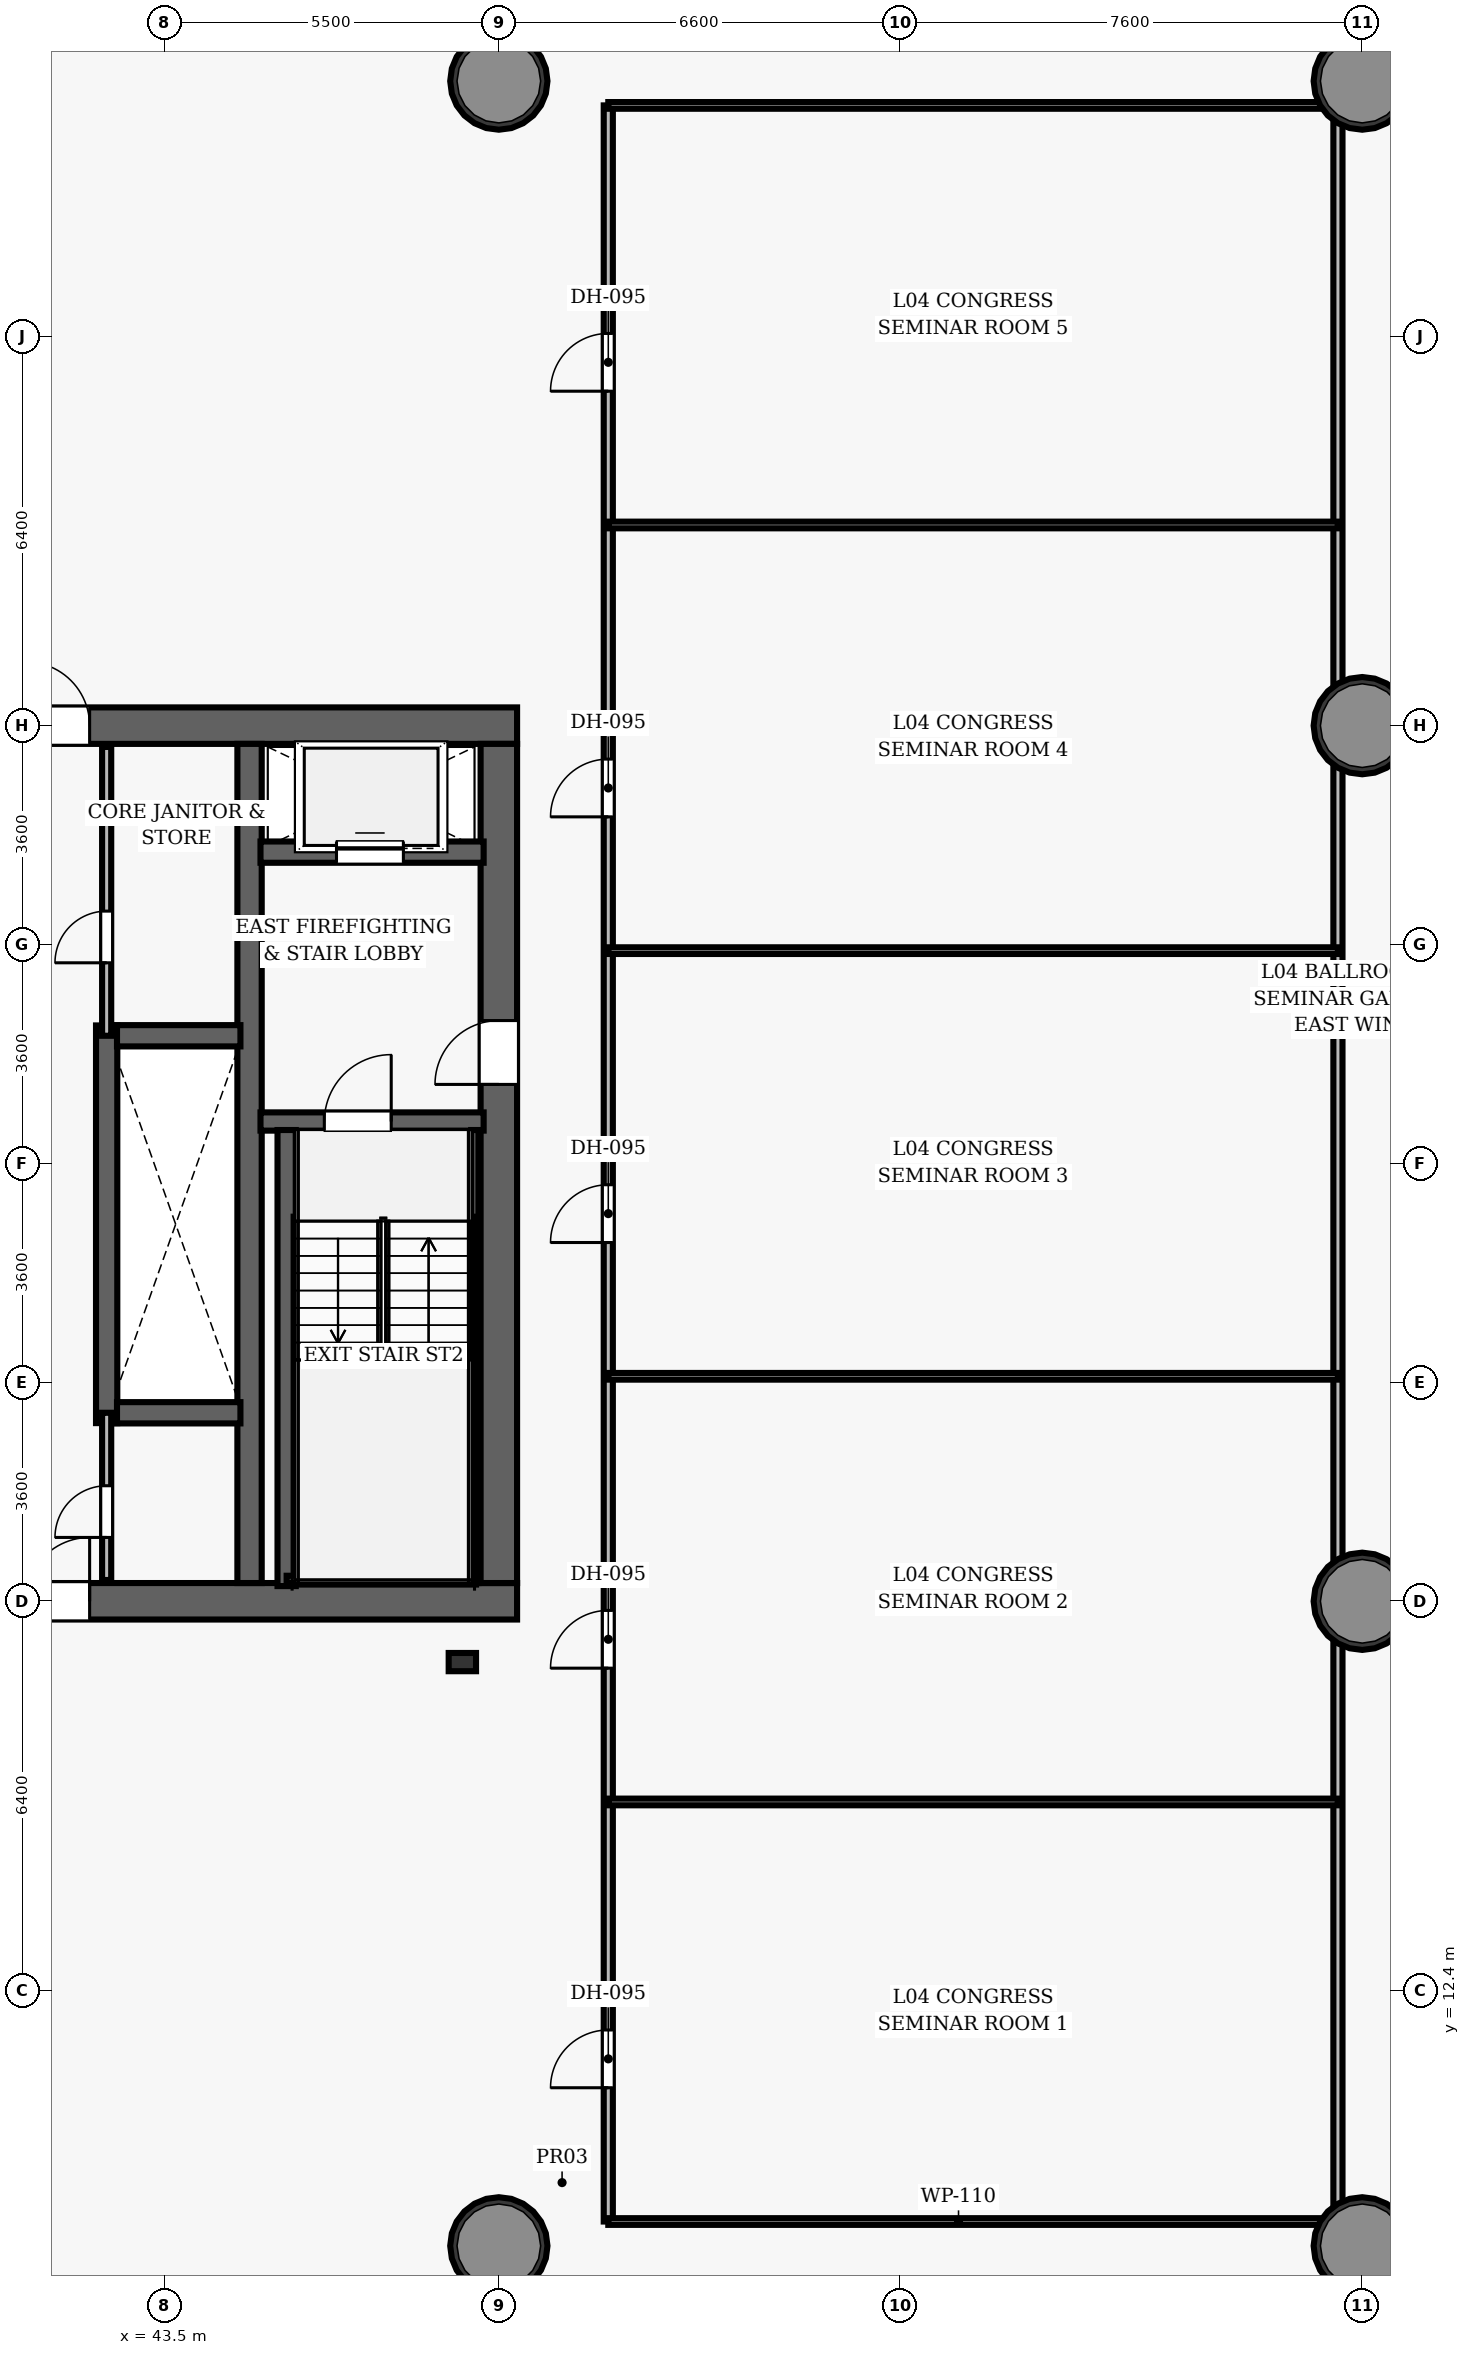
"""IFC4 building model, lengths in metres.
Left out: names, types, materials, properties, quantities, classifications, styles, units other than length and angle.
Written with IfcOpenShell. Run it as: python <this file> out.ifc"""

import sys

from ifc_helpers import new_model, si_unit, direction, frame, frame_2d, origin, origin_2d, place, context, subcontext, project, spatial, rectangle, hollow_circle, extrude, element, fill, save


model = new_model("IFC4")
c1 = context("Model", 3, precision=1e-05, world=origin(), true_north=direction((0.0, 1.0)))
c2 = subcontext(c1, "Body", "Model", "MODEL_VIEW")
j1 = project(units=[si_unit("LENGTHUNIT", "METRE"), si_unit("PLANEANGLEUNIT", "RADIAN")], contexts=[c1])
p1 = place(None, origin())
s1 = spatial("IfcSite", under=j1, at=p1, CompositionType="ELEMENT")
p2 = place(p1, origin())
s2 = spatial("IfcBuilding", under=s1, at=p2, CompositionType="ELEMENT")
p3 = place(p2, frame((0.0, 0.0, 24.0)))
s3 = spatial("IfcBuildingStorey", under=s2, at=p3, CompositionType="ELEMENT", Elevation=24.0)
p4 = place(p3, frame((26.7, 18.8, 0.0), z_axis=(0.0, 0.0, 1.0), x_axis=(1.0, 0.0, 0.0)))
e1 = element("IfcWall", 1, at=p4, inside=s3, PredefinedType="SHEAR", context=c2, shape_type="SweptSolid", body=[
    extrude(rectangle(XDim=22.6, YDim=0.6, at=frame_2d((11.3, 0.0))), origin(), (0.0, 0.0, 1.0), 6.0),
])
p5 = place(p4, frame((14.52, 0.0, 0.0)))
e2 = element("IfcOpeningElement", 2, at=p5, cuts=e1, PredefinedType="OPENING", context=c2, shape_type="SweptSolid", body=[
    extrude(rectangle(XDim=1.05, YDim=2.15, at=frame_2d((0.525, 1.075))), frame((0.0, 0.31, 0.0), z_axis=(0.0, -1.0, 0.0), x_axis=(1.0, 0.0, 0.0)), (0.0, 0.0, 1.0), 0.62),
])
p6 = place(p3, frame((26.7, 33.2, 0.0), z_axis=(0.0, 0.0, 1.0), x_axis=(1.0, 0.0, 0.0)))
e3 = element("IfcWall", 3, at=p6, inside=s3, PredefinedType="SHEAR", context=c2, shape_type="SweptSolid", body=[
    extrude(rectangle(XDim=22.6, YDim=0.6, at=frame_2d((11.3, 0.0))), origin(), (0.0, 0.0, 1.0), 6.0),
])
p7 = place(p6, frame((4.62, 0.0, 0.0)))
e4 = element("IfcOpeningElement", 4, at=p7, cuts=e3, PredefinedType="OPENING", context=c2, shape_type="SweptSolid", body=[
    extrude(rectangle(XDim=1.05, YDim=2.15, at=frame_2d((0.525, 1.075))), frame((0.0, 0.31, 0.0), z_axis=(0.0, -1.0, 0.0), x_axis=(1.0, 0.0, 0.0)), (0.0, 0.0, 1.0), 0.62),
])
p8 = place(p6, frame((14.52, 0.0, 0.0)))
e5 = element("IfcOpeningElement", 5, at=p8, cuts=e3, PredefinedType="OPENING", context=c2, shape_type="SweptSolid", body=[
    extrude(rectangle(XDim=1.05, YDim=2.15, at=frame_2d((0.525, 1.075))), frame((0.0, 0.31, 0.0), z_axis=(0.0, -1.0, 0.0), x_axis=(1.0, 0.0, 0.0)), (0.0, 0.0, 1.0), 0.62),
])
p9 = place(p3, frame((49.0, 19.1, 0.0), z_axis=(0.0, 0.0, 1.0), x_axis=(0.0, 1.0, 0.0)))
e6 = element("IfcWall", 6, at=p9, inside=s3, PredefinedType="SHEAR", context=c2, shape_type="SweptSolid", body=[
    extrude(rectangle(XDim=13.8, YDim=0.6, at=frame_2d((6.9, 0.0))), origin(), (0.0, 0.0, 1.0), 6.0),
])
p10 = place(p9, frame((8.2, 0.0, 0.0)))
e7 = element("IfcOpeningElement", 7, at=p10, cuts=e6, PredefinedType="OPENING", context=c2, shape_type="SweptSolid", body=[
    extrude(rectangle(XDim=1.05, YDim=2.15, at=frame_2d((0.525, 1.075))), frame((0.0, 0.31, 0.0), z_axis=(0.0, -1.0, 0.0), x_axis=(1.0, 0.0, 0.0)), (0.0, 0.0, 1.0), 0.62),
])
p11 = place(p3, frame((44.9, 19.1, 0.0), z_axis=(0.0, 0.0, 1.0), x_axis=(0.0, 1.0, 0.0)))
e8 = element("IfcWall", 8, at=p11, inside=s3, PredefinedType="SHEAR", context=c2, shape_type="SweptSolid", body=[
    extrude(rectangle(XDim=13.8, YDim=0.4, at=frame_2d((6.9, 0.0))), origin(), (0.0, 0.0, 1.0), 6.0),
])
for number, where, z_axis, x_axis in (
    (9, (49.0, 8.2, 0.0), (0.0, 0.0, 1.0), (1.0, 0.0, 0.0)),
    (10, (63.2, 8.2, 0.0), (0.0, 0.0, 1.0), (1.0, 0.0, 0.0)),
    (11, (63.2, 18.8, 0.0), (0.0, 0.0, 1.0), (1.0, 0.0, 0.0)),
    (12, (63.2, 33.2, 0.0), (0.0, 0.0, 1.0), (1.0, 0.0, 0.0)),
    (13, (49.0, 43.8, 0.0), (0.0, 0.0, 1.0), (1.0, 0.0, 0.0)),
    (14, (63.2, 43.8, 0.0), (0.0, 0.0, 1.0), (1.0, 0.0, 0.0)),
):
    element("IfcColumn", number, at=place(p3, frame(where, z_axis=z_axis, x_axis=x_axis)), inside=s3, PredefinedType="COLUMN", context=c2, shape_type="SweptSolid", body=[
        extrude(hollow_circle(Radius=0.8, WallThickness=0.06, at=origin_2d()), origin(), (0.0, 0.0, 1.0), 6.0),
    ])
p12 = place(p3, frame((45.08, 26.69, 0.0), z_axis=(0.0, 0.0, 1.0), x_axis=(1.0, 0.0, 0.0)))
e15 = element("IfcWall", 15, at=p12, inside=s3, PredefinedType="SHEAR", context=c2, shape_type="SweptSolid", body=[
    extrude(rectangle(XDim=3.67, YDim=0.3, at=frame_2d((1.835, 0.0))), origin(), (0.0, 0.0, 1.0), 6.0),
])
p13 = place(p12, frame((1.05, 0.0, 0.0)))
e16 = element("IfcOpeningElement", 16, at=p13, cuts=e15, PredefinedType="OPENING", context=c2, shape_type="SweptSolid", body=[
    extrude(rectangle(XDim=1.1, YDim=2.15, at=frame_2d((0.55, 1.075))), frame((0.0, 0.16, 0.0), z_axis=(0.0, -1.0, 0.0), x_axis=(1.0, 0.0, 0.0)), (0.0, 0.0, 1.0), 0.32),
])
p14 = place(p3, frame((45.51, 19.05, 0.0), z_axis=(0.0, 0.0, 1.0), x_axis=(0.0, 1.0, 0.0)))
e17 = element("IfcWall", 17, at=p14, inside=s3, PredefinedType="SHEAR", context=c2, shape_type="SweptSolid", body=[
    extrude(rectangle(XDim=7.5, YDim=0.3, at=frame_2d((3.75, 0.0))), origin(), (0.0, 0.0, 1.0), 6.0),
])
p15 = place(p3, frame((48.605, 19.1, 0.0), z_axis=(0.0, 0.0, 1.0), x_axis=(0.0, 1.0, 0.0)))
e18 = element("IfcWall", 18, at=p15, inside=s3, PredefinedType="SHEAR", context=c2, shape_type="SweptSolid", body=[
    extrude(rectangle(XDim=7.45, YDim=0.12, at=frame_2d((3.725, 0.0))), origin(), (0.0, 0.0, 1.0), 6.0),
])
p16 = place(p3, frame((45.51, 19.16, 0.0), z_axis=(0.0, 0.0, 1.0), x_axis=(1.0, 0.0, 0.0)))
e19 = element("IfcWall", 19, at=p16, inside=s3, PredefinedType="SHEAR", context=c2, shape_type="SweptSolid", body=[
    extrude(rectangle(XDim=3.095, YDim=0.12, at=frame_2d((1.547, 0.0))), origin(), (0.0, 0.0, 1.0), 6.0),
])
p17 = place(p3, frame((45.08, 31.12, 0.0), z_axis=(0.0, 0.0, 1.0), x_axis=(1.0, 0.0, 0.0)))
e20 = element("IfcWall", 20, at=p17, inside=s3, PredefinedType="SHEAR", context=c2, shape_type="SweptSolid", body=[
    extrude(rectangle(XDim=3.67, YDim=0.35, at=frame_2d((1.835, 0.0))), origin(), (0.0, 0.0, 1.0), 4.71),
])
p18 = place(p17, frame((1.25, 0.0, 0.0)))
e21 = element("IfcOpeningElement", 21, at=p18, cuts=e20, PredefinedType="OPENING", context=c2, shape_type="SweptSolid", body=[
    extrude(rectangle(XDim=1.1, YDim=2.15, at=frame_2d((0.55, 1.075))), frame((0.0, 0.185, 0.0), z_axis=(0.0, -1.0, 0.0), x_axis=(1.0, 0.0, 0.0)), (0.0, 0.0, 1.0), 0.37),
])
p19 = place(p3, frame((42.55, 21.73, 0.0), z_axis=(0.0, 0.0, 1.0), x_axis=(0.0, 1.0, 0.0)))
e22 = element("IfcWall", 22, at=p19, inside=s3, PredefinedType="SHEAR", context=c2, shape_type="SweptSolid", body=[
    extrude(rectangle(XDim=6.54, YDim=0.35, at=frame_2d((3.27, 0.0))), origin(), (0.0, 0.0, 1.0), 4.71),
])
for number, where, z_axis, x_axis in (
    (23, (42.72, 21.9, 0.0), (0.0, 0.0, 1.0), (1.0, 0.0, 0.0)),
    (24, (42.72, 28.1, 0.0), (0.0, 0.0, 1.0), (1.0, 0.0, 0.0)),
):
    element("IfcWall", number, at=place(p3, frame(where, z_axis=z_axis, x_axis=x_axis)), inside=s3, PredefinedType="SHEAR", context=c2, shape_type="SweptSolid", body=[
        extrude(rectangle(XDim=2.03, YDim=0.35, at=frame_2d((1.015, 0.0))), origin(), (0.0, 0.0, 1.0), 4.71),
    ])
p20 = place(p3, frame((42.55, 28.1, 0.0), z_axis=(0.0, 0.0, 1.0), x_axis=(0.0, 1.0, 0.0)))
e25 = element("IfcWall", 25, at=p20, inside=s3, PredefinedType="PARTITIONING", context=c2, shape_type="SweptSolid", body=[
    extrude(rectangle(XDim=4.75, YDim=0.15, at=frame_2d((2.375, 0.0))), origin(), (0.0, 0.0, 1.0), 4.71),
])
p21 = place(p20, frame((1.2, 0.0, 0.0)))
e26 = element("IfcOpeningElement", 26, at=p21, cuts=e25, PredefinedType="OPENING", context=c2, shape_type="SweptSolid", body=[
    extrude(rectangle(XDim=0.85, YDim=2.1, at=frame_2d((0.425, 1.05))), frame((0.0, 0.085, 0.0), z_axis=(0.0, -1.0, 0.0), x_axis=(1.0, 0.0, 0.0)), (0.0, 0.0, 1.0), 0.17),
])
p22 = place(p3, frame((42.55, 19.15, 0.0), z_axis=(0.0, 0.0, 1.0), x_axis=(0.0, 1.0, 0.0)))
e27 = element("IfcWall", 27, at=p22, inside=s3, PredefinedType="PARTITIONING", context=c2, shape_type="SweptSolid", body=[
    extrude(rectangle(XDim=2.75, YDim=0.15, at=frame_2d((1.375, 0.0))), origin(), (0.0, 0.0, 1.0), 4.71),
])
p23 = place(p22, frame((0.7, 0.0, 0.0)))
e28 = element("IfcOpeningElement", 28, at=p23, cuts=e27, PredefinedType="OPENING", context=c2, shape_type="SweptSolid", body=[
    extrude(rectangle(XDim=0.85, YDim=2.1, at=frame_2d((0.425, 1.05))), frame((0.0, 0.085, 0.0), z_axis=(0.0, -1.0, 0.0), x_axis=(1.0, 0.0, 0.0)), (0.0, 0.0, 1.0), 0.17),
])
p24 = place(p3, frame((48.4, 17.8, 0.0), z_axis=(0.0, 0.0, 1.0), x_axis=(1.0, 0.0, 0.0)))
e29 = element("IfcColumn", 29, at=p24, inside=s3, PredefinedType="PILASTER", context=c2, shape_type="SweptSolid", body=[
    extrude(rectangle(XDim=0.45, YDim=0.3, at=origin_2d()), origin(), (0.0, 0.0, 1.0), 6.0),
])
p25 = place(p3, frame((50.8, 8.6, 0.0), z_axis=(0.0, 0.0, 1.0), x_axis=(0.0, 1.0, 0.0)))
e30 = element("IfcWall", 30, at=p25, inside=s3, PredefinedType="PARTITIONING", context=c2, shape_type="SweptSolid", body=[
    extrude(rectangle(XDim=34.8, YDim=0.15, at=frame_2d((17.4, 0.0))), origin(), (0.0, 0.0, 1.0), 4.71),
])
p26 = place(p25, frame((2.2, 0.0, 0.0)))
e31 = element("IfcOpeningElement", 31, at=p26, cuts=e30, PredefinedType="OPENING", context=c2, shape_type="SweptSolid", body=[
    extrude(rectangle(XDim=0.95, YDim=2.15, at=frame_2d((0.475, 1.075))), frame((0.0, 0.085, 0.0), z_axis=(0.0, -1.0, 0.0), x_axis=(1.0, 0.0, 0.0)), (0.0, 0.0, 1.0), 0.17),
])
p27 = place(p25, frame((9.1, 0.0, 0.0)))
e32 = element("IfcOpeningElement", 32, at=p27, cuts=e30, PredefinedType="OPENING", context=c2, shape_type="SweptSolid", body=[
    extrude(rectangle(XDim=0.95, YDim=2.15, at=frame_2d((0.475, 1.075))), frame((0.0, 0.085, 0.0), z_axis=(0.0, -1.0, 0.0), x_axis=(1.0, 0.0, 0.0)), (0.0, 0.0, 1.0), 0.17),
])
p28 = place(p25, frame((16.1, 0.0, 0.0)))
e33 = element("IfcOpeningElement", 33, at=p28, cuts=e30, PredefinedType="OPENING", context=c2, shape_type="SweptSolid", body=[
    extrude(rectangle(XDim=0.95, YDim=2.15, at=frame_2d((0.475, 1.075))), frame((0.0, 0.085, 0.0), z_axis=(0.0, -1.0, 0.0), x_axis=(1.0, 0.0, 0.0)), (0.0, 0.0, 1.0), 0.17),
])
p29 = place(p25, frame((23.1, 0.0, 0.0)))
e34 = element("IfcOpeningElement", 34, at=p29, cuts=e30, PredefinedType="OPENING", context=c2, shape_type="SweptSolid", body=[
    extrude(rectangle(XDim=0.95, YDim=2.15, at=frame_2d((0.475, 1.075))), frame((0.0, 0.085, 0.0), z_axis=(0.0, -1.0, 0.0), x_axis=(1.0, 0.0, 0.0)), (0.0, 0.0, 1.0), 0.17),
])
p30 = place(p25, frame((30.1, 0.0, 0.0)))
e35 = element("IfcOpeningElement", 35, at=p30, cuts=e30, PredefinedType="OPENING", context=c2, shape_type="SweptSolid", body=[
    extrude(rectangle(XDim=0.95, YDim=2.15, at=frame_2d((0.475, 1.075))), frame((0.0, 0.085, 0.0), z_axis=(0.0, -1.0, 0.0), x_axis=(1.0, 0.0, 0.0)), (0.0, 0.0, 1.0), 0.17),
])
p31 = place(p3, frame((62.8, 8.6, 0.0), z_axis=(0.0, 0.0, 1.0), x_axis=(0.0, 1.0, 0.0)))
e36 = element("IfcWall", 36, at=p31, inside=s3, PredefinedType="PARTITIONING", context=c2, shape_type="SweptSolid", body=[
    extrude(rectangle(XDim=34.8, YDim=0.15, at=frame_2d((17.4, 0.0))), origin(), (0.0, 0.0, 1.0), 4.71),
])
for number, where, z_axis, x_axis in (
    (37, (50.8, 8.6, 0.0), (0.0, 0.0, 1.0), (1.0, 0.0, 0.0)),
    (38, (50.8, 15.5, 0.0), (0.0, 0.0, 1.0), (1.0, 0.0, 0.0)),
    (39, (50.8, 22.5, 0.0), (0.0, 0.0, 1.0), (1.0, 0.0, 0.0)),
    (40, (50.8, 29.5, 0.0), (0.0, 0.0, 1.0), (1.0, 0.0, 0.0)),
    (41, (50.8, 36.5, 0.0), (0.0, 0.0, 1.0), (1.0, 0.0, 0.0)),
    (42, (50.8, 43.4, 0.0), (0.0, 0.0, 1.0), (1.0, 0.0, 0.0)),
):
    element("IfcWall", number, at=place(p3, frame(where, z_axis=z_axis, x_axis=x_axis)), inside=s3, PredefinedType="PARTITIONING", context=c2, shape_type="SweptSolid", body=[
        extrude(rectangle(XDim=12.0, YDim=0.11, at=frame_2d((6.0, 0.0))), origin(), (0.0, 0.0, 1.0), 4.71),
    ])
p32 = place(p13, origin())
e43 = element("IfcDoor", 43, at=p32, inside=s3, OperationType="SINGLE_SWING_RIGHT", PredefinedType="DOOR", context=c2, shape_type="SweptSolid", body=[
    extrude(rectangle(XDim=1.1, YDim=2.15, at=frame_2d((0.55, 1.075))), frame((0.0, 0.025, 0.0), z_axis=(0.0, -1.0, 0.0), x_axis=(1.0, 0.0, 0.0)), (0.0, 0.0, 1.0), 0.05),
])
fill(e16, e43)
p33 = place(p10, origin())
e44 = element("IfcDoor", 44, at=p33, inside=s3, OperationType="SINGLE_SWING_LEFT", PredefinedType="DOOR", context=c2, shape_type="SweptSolid", body=[
    extrude(rectangle(XDim=1.05, YDim=2.15, at=frame_2d((0.525, 1.075))), frame((0.0, 0.025, 0.0), z_axis=(0.0, -1.0, 0.0), x_axis=(1.0, 0.0, 0.0)), (0.0, 0.0, 1.0), 0.05),
])
fill(e7, e44)
p34 = place(p8, origin())
e45 = element("IfcDoor", 45, at=p34, inside=s3, OperationType="SINGLE_SWING_LEFT", PredefinedType="DOOR", context=c2, shape_type="SweptSolid", body=[
    extrude(rectangle(XDim=1.05, YDim=2.15, at=frame_2d((0.525, 1.075))), frame((0.0, 0.025, 0.0), z_axis=(0.0, -1.0, 0.0), x_axis=(1.0, 0.0, 0.0)), (0.0, 0.0, 1.0), 0.05),
])
fill(e5, e45)
p35 = place(p5, origin())
e46 = element("IfcDoor", 46, at=p35, inside=s3, OperationType="SINGLE_SWING_RIGHT", PredefinedType="DOOR", context=c2, shape_type="SweptSolid", body=[
    extrude(rectangle(XDim=1.05, YDim=2.15, at=frame_2d((0.525, 1.075))), frame((0.0, 0.025, 0.0), z_axis=(0.0, -1.0, 0.0), x_axis=(1.0, 0.0, 0.0)), (0.0, 0.0, 1.0), 0.05),
])
fill(e2, e46)
p36 = place(p21, origin())
e47 = element("IfcDoor", 47, at=p36, inside=s3, OperationType="SINGLE_SWING_LEFT", PredefinedType="DOOR", context=c2, shape_type="SweptSolid", body=[
    extrude(rectangle(XDim=0.85, YDim=2.1, at=frame_2d((0.425, 1.05))), frame((0.0, 0.025, 0.0), z_axis=(0.0, -1.0, 0.0), x_axis=(1.0, 0.0, 0.0)), (0.0, 0.0, 1.0), 0.05),
])
fill(e26, e47)
p37 = place(p23, origin())
e48 = element("IfcDoor", 48, at=p37, inside=s3, OperationType="SINGLE_SWING_LEFT", PredefinedType="DOOR", context=c2, shape_type="SweptSolid", body=[
    extrude(rectangle(XDim=0.85, YDim=2.1, at=frame_2d((0.425, 1.05))), frame((0.0, 0.025, 0.0), z_axis=(0.0, -1.0, 0.0), x_axis=(1.0, 0.0, 0.0)), (0.0, 0.0, 1.0), 0.05),
])
fill(e28, e48)
p38 = place(p26, origin())
e49 = element("IfcDoor", 49, at=p38, inside=s3, OperationType="SINGLE_SWING_LEFT", PredefinedType="DOOR", context=c2, shape_type="SweptSolid", body=[
    extrude(rectangle(XDim=0.95, YDim=2.15, at=frame_2d((0.475, 1.075))), frame((0.0, 0.025, 0.0), z_axis=(0.0, -1.0, 0.0), x_axis=(1.0, 0.0, 0.0)), (0.0, 0.0, 1.0), 0.05),
])
fill(e31, e49)
p39 = place(p27, origin())
e50 = element("IfcDoor", 50, at=p39, inside=s3, OperationType="SINGLE_SWING_LEFT", PredefinedType="DOOR", context=c2, shape_type="SweptSolid", body=[
    extrude(rectangle(XDim=0.95, YDim=2.15, at=frame_2d((0.475, 1.075))), frame((0.0, 0.025, 0.0), z_axis=(0.0, -1.0, 0.0), x_axis=(1.0, 0.0, 0.0)), (0.0, 0.0, 1.0), 0.05),
])
fill(e32, e50)
p40 = place(p28, origin())
e51 = element("IfcDoor", 51, at=p40, inside=s3, OperationType="SINGLE_SWING_LEFT", PredefinedType="DOOR", context=c2, shape_type="SweptSolid", body=[
    extrude(rectangle(XDim=0.95, YDim=2.15, at=frame_2d((0.475, 1.075))), frame((0.0, 0.025, 0.0), z_axis=(0.0, -1.0, 0.0), x_axis=(1.0, 0.0, 0.0)), (0.0, 0.0, 1.0), 0.05),
])
fill(e33, e51)
p41 = place(p29, origin())
e52 = element("IfcDoor", 52, at=p41, inside=s3, OperationType="SINGLE_SWING_LEFT", PredefinedType="DOOR", context=c2, shape_type="SweptSolid", body=[
    extrude(rectangle(XDim=0.95, YDim=2.15, at=frame_2d((0.475, 1.075))), frame((0.0, 0.025, 0.0), z_axis=(0.0, -1.0, 0.0), x_axis=(1.0, 0.0, 0.0)), (0.0, 0.0, 1.0), 0.05),
])
fill(e34, e52)
p42 = place(p30, origin())
e53 = element("IfcDoor", 53, at=p42, inside=s3, OperationType="SINGLE_SWING_LEFT", PredefinedType="DOOR", context=c2, shape_type="SweptSolid", body=[
    extrude(rectangle(XDim=0.95, YDim=2.15, at=frame_2d((0.475, 1.075))), frame((0.0, 0.025, 0.0), z_axis=(0.0, -1.0, 0.0), x_axis=(1.0, 0.0, 0.0)), (0.0, 0.0, 1.0), 0.05),
])
fill(e35, e53)
p43 = place(p18, origin())
e54 = element("IfcDoor", 54, at=p43, inside=s3, OperationType="SLIDING_TO_LEFT", PredefinedType="DOOR", context=c2, shape_type="SweptSolid", body=[
    extrude(rectangle(XDim=1.1, YDim=2.15, at=frame_2d((0.55, 1.075))), frame((0.0, 0.025, 0.0), z_axis=(0.0, -1.0, 0.0), x_axis=(1.0, 0.0, 0.0)), (0.0, 0.0, 1.0), 0.05),
])
fill(e21, e54)
save(model, sys.argv[1])
